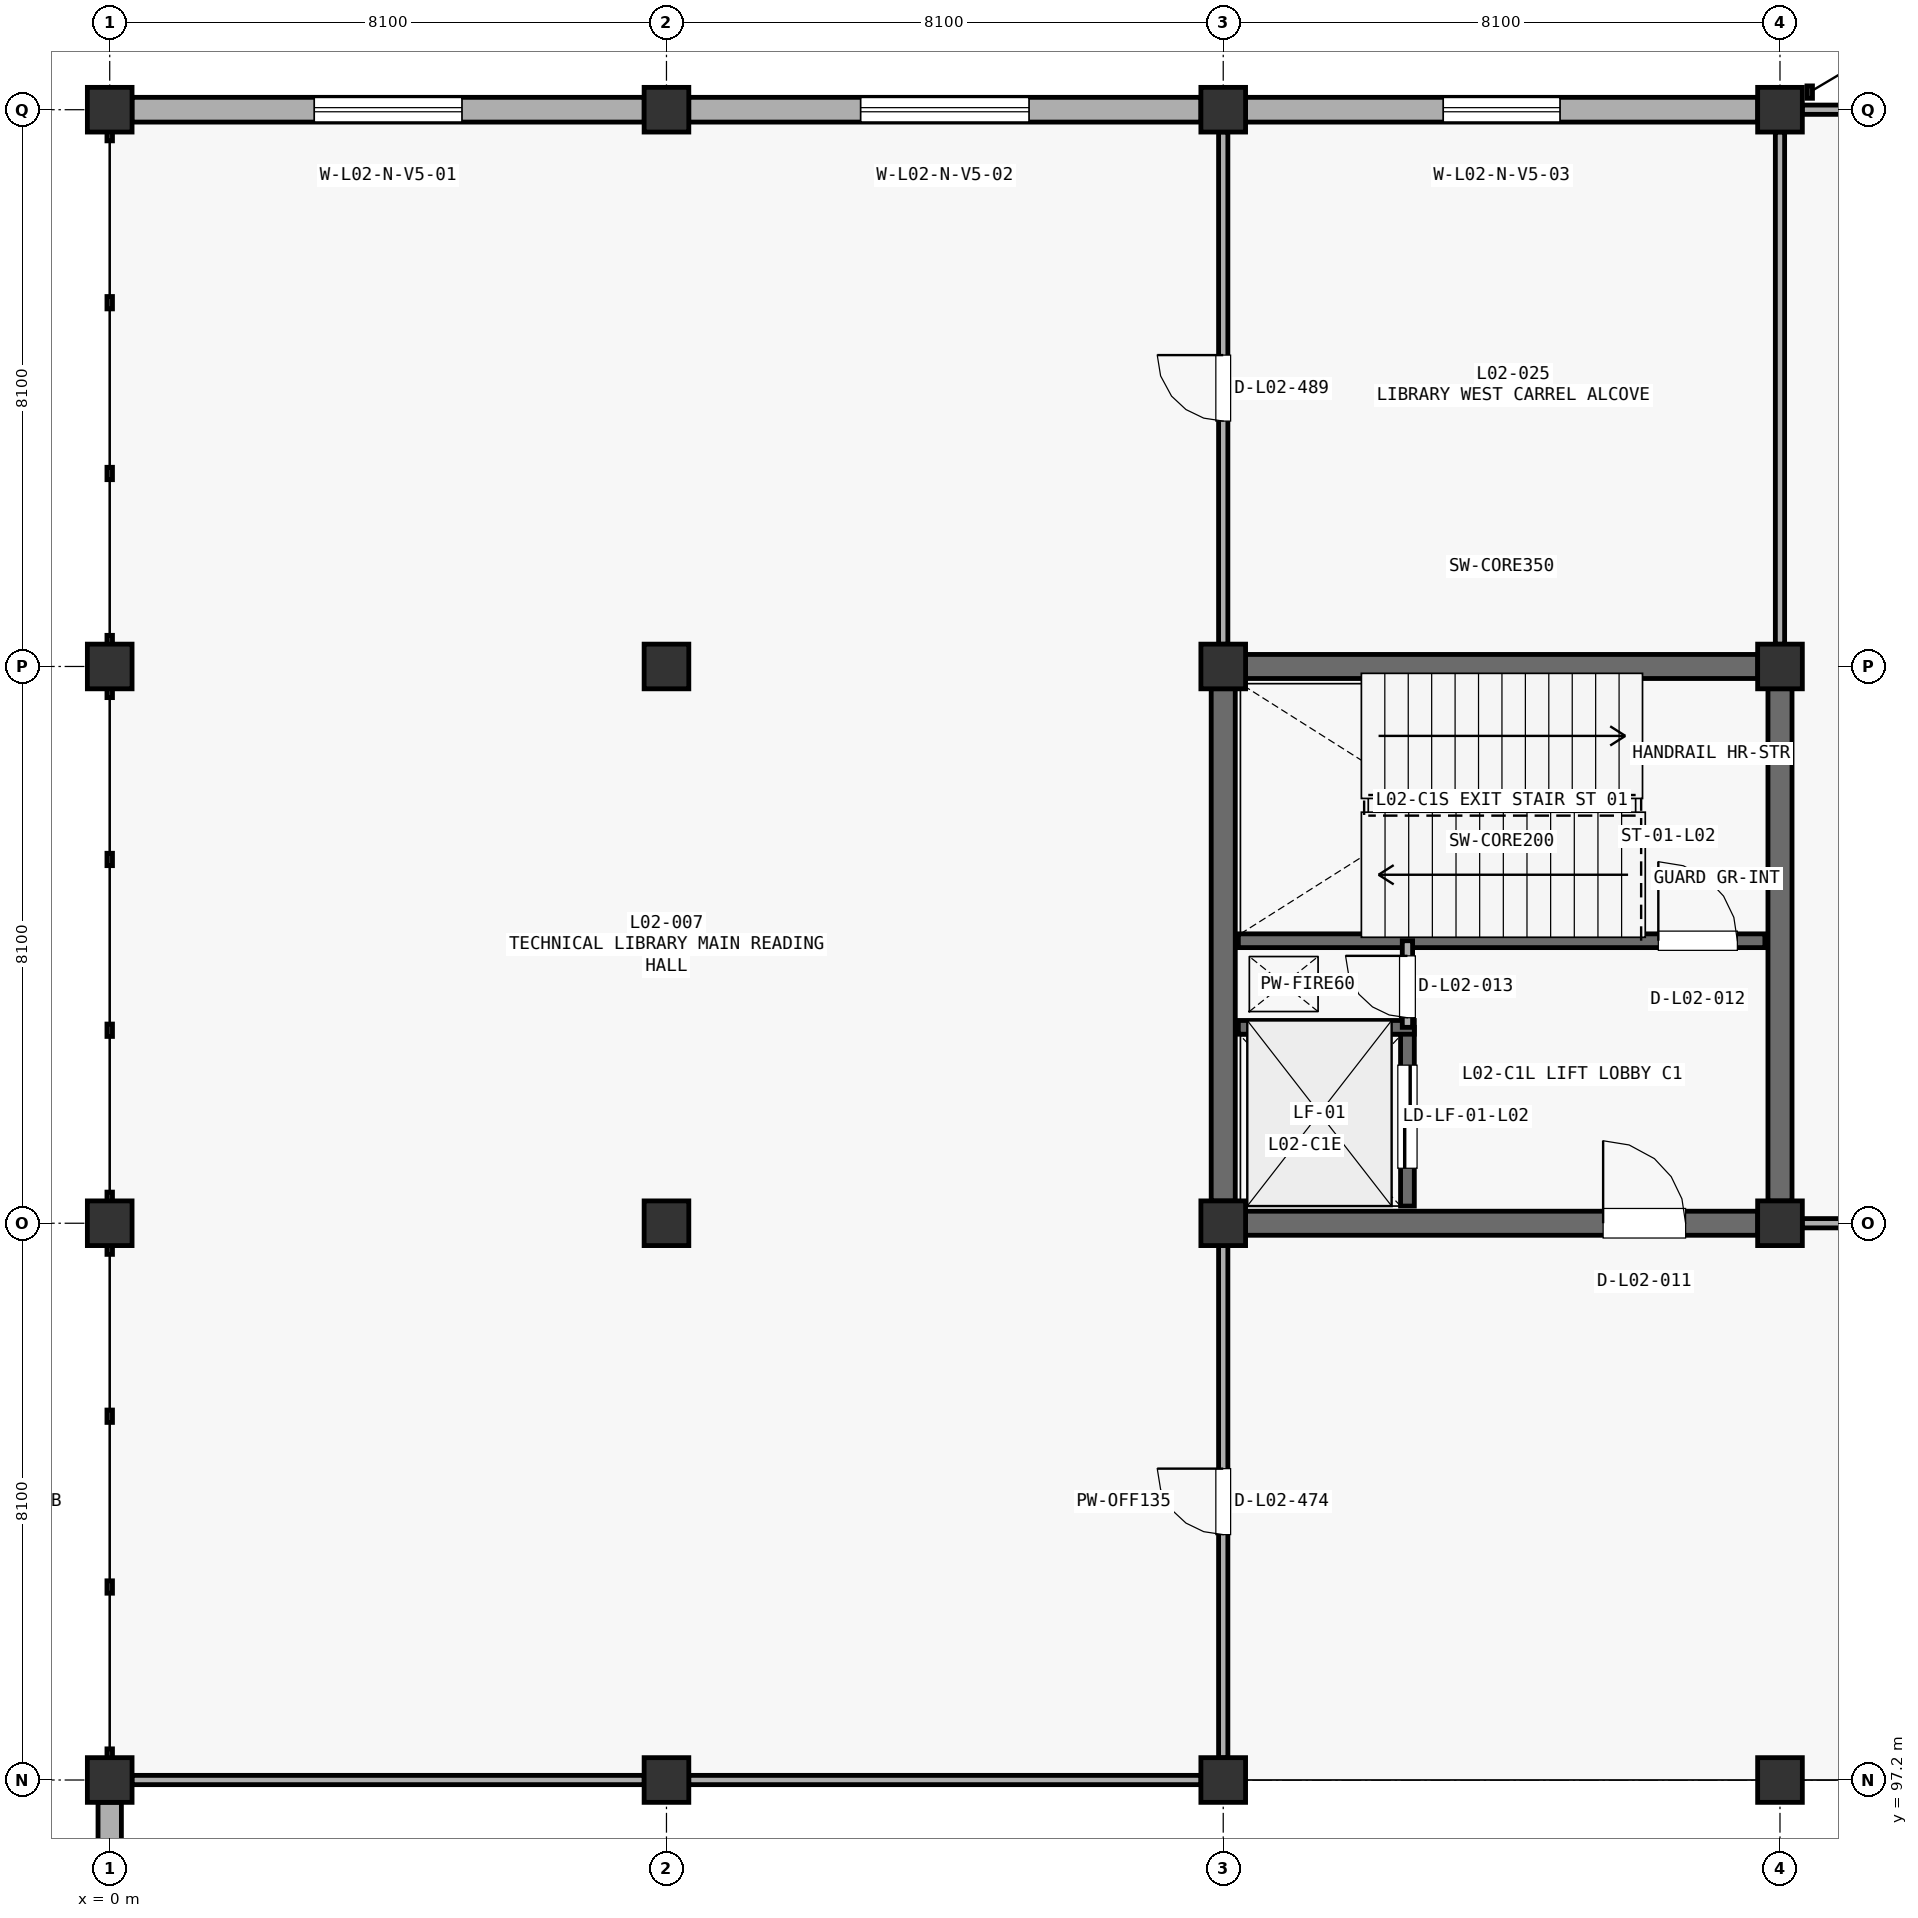
"""IFC4 building model, lengths in metres.
Left out: names, types, materials, properties, quantities, classifications, styles, units other than length and angle.
Written with IfcOpenShell. Run it as: python <this file> out.ifc"""

import sys

from ifc_helpers import new_model, si_unit, direction, frame, frame_2d, origin, origin_2d, place, context, subcontext, project, spatial, rectangle, extrude, element, fill, save


model = new_model("IFC4")
c1 = context("Model", 3, precision=1e-05, world=origin(), true_north=direction((0.0, 1.0)))
c2 = subcontext(c1, "Body", "Model", "MODEL_VIEW")
j1 = project(units=[si_unit("LENGTHUNIT", "METRE"), si_unit("PLANEANGLEUNIT", "RADIAN")], contexts=[c1])
p1 = place(None, origin())
s1 = spatial("IfcSite", under=j1, at=p1, CompositionType="ELEMENT")
p2 = place(p1, origin())
s2 = spatial("IfcBuilding", under=s1, at=p2, CompositionType="ELEMENT")
p3 = place(p2, frame((0.0, 0.0, 9.69)))
s3 = spatial("IfcBuildingStorey", under=s2, at=p3, CompositionType="ELEMENT", Elevation=9.69)
for number, where, z_axis, x_axis in (
    (1, (0.0, 97.2, 0.0), (0.0, 0.0, 1.0), (1.0, 0.0, 0.0)),
    (2, (0.0, 105.3, 0.0), (0.0, 0.0, 1.0), (1.0, 0.0, 0.0)),
    (3, (0.0, 113.4, 0.0), (0.0, 0.0, 1.0), (1.0, 0.0, 0.0)),
    (4, (0.0, 121.5, 0.0), (0.0, 0.0, 1.0), (1.0, 0.0, 0.0)),
    (5, (8.1, 97.2, 0.0), (0.0, 0.0, 1.0), (1.0, 0.0, 0.0)),
    (6, (8.1, 105.3, 0.0), (0.0, 0.0, 1.0), (1.0, 0.0, 0.0)),
    (7, (8.1, 113.4, 0.0), (0.0, 0.0, 1.0), (1.0, 0.0, 0.0)),
    (8, (8.1, 121.5, 0.0), (0.0, 0.0, 1.0), (1.0, 0.0, 0.0)),
    (9, (16.2, 97.2, 0.0), (0.0, 0.0, 1.0), (1.0, 0.0, 0.0)),
    (10, (16.2, 105.3, 0.0), (0.0, 0.0, 1.0), (1.0, 0.0, 0.0)),
    (11, (16.2, 113.4, 0.0), (0.0, 0.0, 1.0), (1.0, 0.0, 0.0)),
    (12, (16.2, 121.5, 0.0), (0.0, 0.0, 1.0), (1.0, 0.0, 0.0)),
    (13, (24.3, 97.2, 0.0), (0.0, 0.0, 1.0), (1.0, 0.0, 0.0)),
    (14, (24.3, 105.3, 0.0), (0.0, 0.0, 1.0), (1.0, 0.0, 0.0)),
    (15, (24.3, 113.4, 0.0), (0.0, 0.0, 1.0), (1.0, 0.0, 0.0)),
    (16, (24.3, 121.5, 0.0), (0.0, 0.0, 1.0), (1.0, 0.0, 0.0)),
):
    element("IfcColumn", number, at=place(p3, frame(where, z_axis=z_axis, x_axis=x_axis)), inside=s3, PredefinedType="COLUMN", context=c2, shape_type="SweptSolid", body=[
        extrude(rectangle(XDim=0.65, YDim=0.65, at=origin_2d()), origin(), (0.0, 0.0, 1.0), 4.42),
    ])
p4 = place(p3, frame((0.0, 89.225, -0.38), z_axis=(0.0, 0.0, 1.0), x_axis=(0.0, 1.0, 0.0)))
e17 = element("IfcWall", 17, at=p4, inside=s3, PredefinedType="STANDARD", context=c2, shape_type="SweptSolid", body=[
    extrude(rectangle(XDim=7.652, YDim=0.34, at=frame_2d((3.826, 0.0))), origin(), (0.0, 0.0, 1.0), 4.522),
])
p5 = place(p4, frame((2.776, 0.0, 1.63)))
e18 = element("IfcOpeningElement", 18, at=p5, cuts=e17, PredefinedType="OPENING", context=c2, shape_type="SweptSolid", body=[
    extrude(rectangle(XDim=2.1, YDim=1.5, at=frame_2d((1.05, 0.75))), frame((0.0, 0.18, 0.0), z_axis=(0.0, -1.0, 0.0), x_axis=(1.0, 0.0, 0.0)), (0.0, 0.0, 1.0), 0.36),
])
p6 = place(p3, frame((0.323, 121.5, 0.0), z_axis=(0.0, 0.0, 1.0), x_axis=(1.0, 0.0, 0.0)))
e19 = element("IfcWall", 19, at=p6, inside=s3, PredefinedType="STANDARD", context=c2, shape_type="SweptSolid", body=[
    extrude(rectangle(XDim=7.454, YDim=0.36, at=frame_2d((3.727, 0.0))), origin(), (0.0, 0.0, 1.0), 3.667),
])
p7 = place(p6, frame((2.652, 0.0, 0.85)))
e20 = element("IfcOpeningElement", 20, at=p7, cuts=e19, PredefinedType="OPENING", context=c2, shape_type="SweptSolid", body=[
    extrude(rectangle(XDim=2.15, YDim=1.7, at=frame_2d((1.075, 0.85))), frame((0.0, 0.19, 0.0), z_axis=(0.0, -1.0, 0.0), x_axis=(1.0, 0.0, 0.0)), (0.0, 0.0, 1.0), 0.38),
])
p8 = place(p3, frame((8.423, 121.5, 0.0), z_axis=(0.0, 0.0, 1.0), x_axis=(1.0, 0.0, 0.0)))
e21 = element("IfcWall", 21, at=p8, inside=s3, PredefinedType="STANDARD", context=c2, shape_type="SweptSolid", body=[
    extrude(rectangle(XDim=7.454, YDim=0.36, at=frame_2d((3.727, 0.0))), origin(), (0.0, 0.0, 1.0), 3.132),
])
p9 = place(p8, frame((2.502, 0.0, 0.85)))
e22 = element("IfcOpeningElement", 22, at=p9, cuts=e21, PredefinedType="OPENING", context=c2, shape_type="SweptSolid", body=[
    extrude(rectangle(XDim=2.45, YDim=1.7, at=frame_2d((1.225, 0.85))), frame((0.0, 0.19, 0.0), z_axis=(0.0, -1.0, 0.0), x_axis=(1.0, 0.0, 0.0)), (0.0, 0.0, 1.0), 0.38),
])
p10 = place(p3, frame((16.523, 121.5, 0.0), z_axis=(0.0, 0.0, 1.0), x_axis=(1.0, 0.0, 0.0)))
e23 = element("IfcWall", 23, at=p10, inside=s3, PredefinedType="STANDARD", context=c2, shape_type="SweptSolid", body=[
    extrude(rectangle(XDim=7.454, YDim=0.36, at=frame_2d((3.727, 0.0))), origin(), (0.0, 0.0, 1.0), 3.332),
])
p11 = place(p10, frame((2.877, 0.0, 0.85)))
e24 = element("IfcOpeningElement", 24, at=p11, cuts=e23, PredefinedType="OPENING", context=c2, shape_type="SweptSolid", body=[
    extrude(rectangle(XDim=1.7, YDim=1.7, at=frame_2d((0.85, 0.85))), frame((0.0, 0.19, 0.0), z_axis=(0.0, -1.0, 0.0), x_axis=(1.0, 0.0, 0.0)), (0.0, 0.0, 1.0), 0.38),
])
p12 = place(p3, frame((16.523, 113.4, 0.0), z_axis=(0.0, 0.0, 1.0), x_axis=(1.0, 0.0, 0.0)))
e25 = element("IfcWall", 25, at=p12, inside=s3, PredefinedType="SHEAR", context=c2, shape_type="SweptSolid", body=[
    extrude(rectangle(XDim=7.454, YDim=0.35, at=frame_2d((3.727, 0.0))), origin(), (0.0, 0.0, 1.0), 4.082),
])
for number, where, z_axis, x_axis in (
    (26, (16.2, 105.623, 0.0), (0.0, 0.0, 1.0), (0.0, 1.0, 0.0)),
    (27, (24.3, 105.623, 0.0), (0.0, 0.0, 1.0), (0.0, 1.0, 0.0)),
):
    element("IfcWall", number, at=place(p3, frame(where, z_axis=z_axis, x_axis=x_axis)), inside=s3, PredefinedType="SHEAR", context=c2, shape_type="SweptSolid", body=[
        extrude(rectangle(XDim=7.454, YDim=0.35, at=frame_2d((3.727, 0.0))), origin(), (0.0, 0.0, 1.0), 4.082),
    ])
p13 = place(p3, frame((16.523, 105.3, 0.0), z_axis=(0.0, 0.0, 1.0), x_axis=(1.0, 0.0, 0.0)))
e28 = element("IfcWall", 28, at=p13, inside=s3, PredefinedType="SHEAR", context=c2, shape_type="SweptSolid", body=[
    extrude(rectangle(XDim=7.454, YDim=0.35, at=frame_2d((3.727, 0.0))), origin(), (0.0, 0.0, 1.0), 4.082),
])
p14 = place(p13, frame((5.204, 0.0, 0.0)))
e29 = element("IfcOpeningElement", 29, at=p14, cuts=e28, PredefinedType="OPENING", context=c2, shape_type="SweptSolid", body=[
    extrude(rectangle(XDim=1.2, YDim=2.2, at=frame_2d((0.6, 1.1))), frame((0.0, 0.185, 0.0), z_axis=(0.0, -1.0, 0.0), x_axis=(1.0, 0.0, 0.0)), (0.0, 0.0, 1.0), 0.37),
])
p15 = place(p3, frame((16.42, 109.41, 0.0), z_axis=(0.0, 0.0, 1.0), x_axis=(1.0, 0.0, 0.0)))
e30 = element("IfcWall", 30, at=p15, inside=s3, PredefinedType="SHEAR", context=c2, shape_type="SweptSolid", body=[
    extrude(rectangle(XDim=7.66, YDim=0.2, at=frame_2d((3.83, 0.0))), origin(), (0.0, 0.0, 1.0), 4.082),
])
p16 = place(p15, frame((6.11, 0.0, 0.0)))
e31 = element("IfcOpeningElement", 31, at=p16, cuts=e30, PredefinedType="OPENING", context=c2, shape_type="SweptSolid", body=[
    extrude(rectangle(XDim=1.15, YDim=2.2, at=frame_2d((0.575, 1.1))), frame((0.0, 0.11, 0.0), z_axis=(0.0, -1.0, 0.0), x_axis=(1.0, 0.0, 0.0)), (0.0, 0.0, 1.0), 0.22),
])
p17 = place(p3, frame((18.88, 105.55, 0.0), z_axis=(0.0, 0.0, 1.0), x_axis=(0.0, 1.0, 0.0)))
e32 = element("IfcWall", 32, at=p17, inside=s3, PredefinedType="SHEAR", context=c2, shape_type="SweptSolid", body=[
    extrude(rectangle(XDim=2.6, YDim=0.2, at=frame_2d((1.3, 0.0))), origin(), (0.0, 0.0, 1.0), 4.082),
])
p18 = place(p17, frame((0.55, 0.0, 0.0)))
e33 = element("IfcOpeningElement", 33, at=p18, cuts=e32, PredefinedType="OPENING", context=c2, shape_type="SweptSolid", body=[
    extrude(rectangle(XDim=1.5, YDim=2.3, at=frame_2d((0.75, 1.15))), frame((0.0, 0.11, 0.0), z_axis=(0.0, -1.0, 0.0), x_axis=(1.0, 0.0, 0.0)), (0.0, 0.0, 1.0), 0.22),
])
p19 = place(p3, frame((16.42, 108.15, 0.0), z_axis=(0.0, 0.0, 1.0), x_axis=(1.0, 0.0, 0.0)))
e34 = element("IfcWall", 34, at=p19, inside=s3, PredefinedType="SHEAR", context=c2, shape_type="SweptSolid", body=[
    extrude(rectangle(XDim=2.56, YDim=0.2, at=frame_2d((1.28, 0.0))), origin(), (0.0, 0.0, 1.0), 4.082),
])
p20 = place(p3, frame((18.88, 108.15, 0.0), z_axis=(0.0, 0.0, 1.0), x_axis=(0.0, 1.0, 0.0)))
e35 = element("IfcWall", 35, at=p20, inside=s3, PredefinedType="PARTITIONING", context=c2, shape_type="SweptSolid", body=[
    extrude(rectangle(XDim=1.26, YDim=0.15, at=frame_2d((0.63, 0.0))), origin(), (0.0, 0.0, 1.0), 4.082),
])
p21 = place(p20, frame((0.14, 0.0, 0.0)))
e36 = element("IfcOpeningElement", 36, at=p21, cuts=e35, PredefinedType="OPENING", context=c2, shape_type="SweptSolid", body=[
    extrude(rectangle(XDim=0.9, YDim=2.15, at=frame_2d((0.45, 1.075))), frame((0.0, 0.085, 0.0), z_axis=(0.0, -1.0, 0.0), x_axis=(1.0, 0.0, 0.0)), (0.0, 0.0, 1.0), 0.17),
])
p22 = place(p3, frame((16.2, 97.523, 0.0), z_axis=(0.0, 0.0, 1.0), x_axis=(0.0, 1.0, 0.0)))
e37 = element("IfcWall", 37, at=p22, inside=s3, PredefinedType="PARTITIONING", context=c2, shape_type="SweptSolid", body=[
    extrude(rectangle(XDim=7.454, YDim=0.135, at=frame_2d((3.727, 0.0))), origin(), (0.0, 0.0, 1.0), 3.132),
])
p23 = place(p22, frame((3.247, 0.0, 0.0)))
e38 = element("IfcOpeningElement", 38, at=p23, cuts=e37, PredefinedType="OPENING", context=c2, shape_type="SweptSolid", body=[
    extrude(rectangle(XDim=0.96, YDim=2.15, at=frame_2d((0.48, 1.075))), frame((0.0, 0.078, 0.0), z_axis=(0.0, -1.0, 0.0), x_axis=(1.0, 0.0, 0.0)), (0.0, 0.0, 1.0), 0.155),
])
p24 = place(p3, frame((16.2, 113.723, 0.0), z_axis=(0.0, 0.0, 1.0), x_axis=(0.0, 1.0, 0.0)))
e39 = element("IfcWall", 39, at=p24, inside=s3, PredefinedType="PARTITIONING", context=c2, shape_type="SweptSolid", body=[
    extrude(rectangle(XDim=7.454, YDim=0.135, at=frame_2d((3.727, 0.0))), origin(), (0.0, 0.0, 1.0), 3.432),
])
p25 = place(p24, frame((3.247, 0.0, 0.0)))
e40 = element("IfcOpeningElement", 40, at=p25, cuts=e39, PredefinedType="OPENING", context=c2, shape_type="SweptSolid", body=[
    extrude(rectangle(XDim=0.96, YDim=2.15, at=frame_2d((0.48, 1.075))), frame((0.0, 0.078, 0.0), z_axis=(0.0, -1.0, 0.0), x_axis=(1.0, 0.0, 0.0)), (0.0, 0.0, 1.0), 0.155),
])
p26 = place(p3, frame((0.323, 97.2, 0.0), z_axis=(0.0, 0.0, 1.0), x_axis=(1.0, 0.0, 0.0)))
e41 = element("IfcWall", 41, at=p26, inside=s3, PredefinedType="PARTITIONING", context=c2, shape_type="SweptSolid", body=[
    extrude(rectangle(XDim=7.454, YDim=0.135, at=frame_2d((3.727, 0.0))), origin(), (0.0, 0.0, 1.0), 3.667),
])
p27 = place(p3, frame((8.423, 97.2, 0.0), z_axis=(0.0, 0.0, 1.0), x_axis=(1.0, 0.0, 0.0)))
e42 = element("IfcWall", 42, at=p27, inside=s3, PredefinedType="PARTITIONING", context=c2, shape_type="SweptSolid", body=[
    extrude(rectangle(XDim=7.454, YDim=0.135, at=frame_2d((3.727, 0.0))), origin(), (0.0, 0.0, 1.0), 3.432),
])
p28 = place(p3, frame((24.623, 105.3, 0.0), z_axis=(0.0, 0.0, 1.0), x_axis=(1.0, 0.0, 0.0)))
e43 = element("IfcWall", 43, at=p28, inside=s3, PredefinedType="PARTITIONING", context=c2, shape_type="SweptSolid", body=[
    extrude(rectangle(XDim=7.454, YDim=0.135, at=frame_2d((3.727, 0.0))), origin(), (0.0, 0.0, 1.0), 3.132),
])
p29 = place(p28, frame((3.247, 0.0, 0.0)))
e44 = element("IfcOpeningElement", 44, at=p29, cuts=e43, PredefinedType="OPENING", context=c2, shape_type="SweptSolid", body=[
    extrude(rectangle(XDim=0.96, YDim=2.15, at=frame_2d((0.48, 1.075))), frame((0.0, 0.078, 0.0), z_axis=(0.0, -1.0, 0.0), x_axis=(1.0, 0.0, 0.0)), (0.0, 0.0, 1.0), 0.155),
])
p30 = place(p3, frame((24.3, 113.723, 0.0), z_axis=(0.0, 0.0, 1.0), x_axis=(0.0, 1.0, 0.0)))
e45 = element("IfcWall", 45, at=p30, inside=s3, PredefinedType="PARTITIONING", context=c2, shape_type="SweptSolid", body=[
    extrude(rectangle(XDim=7.454, YDim=0.135, at=frame_2d((3.727, 0.0))), origin(), (0.0, 0.0, 1.0), 3.232),
])
p31 = place(p3, frame((24.623, 121.5, 0.0), z_axis=(0.0, 0.0, 1.0), x_axis=(1.0, 0.0, 0.0)))
e46 = element("IfcWall", 46, at=p31, inside=s3, PredefinedType="PARTITIONING", context=c2, shape_type="SweptSolid", body=[
    extrude(rectangle(XDim=7.454, YDim=0.135, at=frame_2d((3.727, 0.0))), origin(), (0.0, 0.0, 1.0), 3.667),
])
p32 = place(p7, origin())
e47 = element("IfcWindow", 47, at=p32, inside=s3, PartitioningType="SINGLE_PANEL", PredefinedType="WINDOW", context=c2, shape_type="SweptSolid", body=[
    extrude(rectangle(XDim=2.15, YDim=1.7, at=frame_2d((1.075, 0.85))), frame((0.0, 0.03, 0.0), z_axis=(0.0, -1.0, 0.0), x_axis=(1.0, 0.0, 0.0)), (0.0, 0.0, 1.0), 0.06),
])
fill(e20, e47)
p33 = place(p9, origin())
e48 = element("IfcWindow", 48, at=p33, inside=s3, PartitioningType="SINGLE_PANEL", PredefinedType="WINDOW", context=c2, shape_type="SweptSolid", body=[
    extrude(rectangle(XDim=2.45, YDim=1.7, at=frame_2d((1.225, 0.85))), frame((0.0, 0.03, 0.0), z_axis=(0.0, -1.0, 0.0), x_axis=(1.0, 0.0, 0.0)), (0.0, 0.0, 1.0), 0.06),
])
fill(e22, e48)
p34 = place(p11, origin())
e49 = element("IfcWindow", 49, at=p34, inside=s3, PartitioningType="SINGLE_PANEL", PredefinedType="WINDOW", context=c2, shape_type="SweptSolid", body=[
    extrude(rectangle(XDim=1.7, YDim=1.7, at=frame_2d((0.85, 0.85))), frame((0.0, 0.03, 0.0), z_axis=(0.0, -1.0, 0.0), x_axis=(1.0, 0.0, 0.0)), (0.0, 0.0, 1.0), 0.06),
])
fill(e24, e49)
p35 = place(p14, origin())
e50 = element("IfcDoor", 50, at=p35, inside=s3, OperationType="SINGLE_SWING_LEFT", PredefinedType="DOOR", context=c2, shape_type="SweptSolid", body=[
    extrude(rectangle(XDim=1.2, YDim=2.2, at=frame_2d((0.6, 1.1))), frame((0.0, 0.025, 0.0), z_axis=(0.0, -1.0, 0.0), x_axis=(1.0, 0.0, 0.0)), (0.0, 0.0, 1.0), 0.05),
])
fill(e29, e50)
p36 = place(p16, origin())
e51 = element("IfcDoor", 51, at=p36, inside=s3, OperationType="SINGLE_SWING_LEFT", PredefinedType="DOOR", context=c2, shape_type="SweptSolid", body=[
    extrude(rectangle(XDim=1.15, YDim=2.2, at=frame_2d((0.575, 1.1))), frame((0.0, 0.025, 0.0), z_axis=(0.0, -1.0, 0.0), x_axis=(1.0, 0.0, 0.0)), (0.0, 0.0, 1.0), 0.05),
])
fill(e31, e51)
p37 = place(p18, origin())
e52 = element("IfcDoor", 52, at=p37, inside=s3, OperationType="SLIDING_TO_LEFT", PredefinedType="DOOR", context=c2, shape_type="SweptSolid", body=[
    extrude(rectangle(XDim=1.5, YDim=2.3, at=frame_2d((0.75, 1.15))), frame((0.0, 0.025, 0.0), z_axis=(0.0, -1.0, 0.0), x_axis=(1.0, 0.0, 0.0)), (0.0, 0.0, 1.0), 0.05),
])
fill(e33, e52)
p38 = place(p21, origin())
e53 = element("IfcDoor", 53, at=p38, inside=s3, OperationType="SINGLE_SWING_RIGHT", PredefinedType="DOOR", context=c2, shape_type="SweptSolid", body=[
    extrude(rectangle(XDim=0.9, YDim=2.15, at=frame_2d((0.45, 1.075))), frame((0.0, 0.025, 0.0), z_axis=(0.0, -1.0, 0.0), x_axis=(1.0, 0.0, 0.0)), (0.0, 0.0, 1.0), 0.05),
])
fill(e36, e53)
p39 = place(p23, origin())
e54 = element("IfcDoor", 54, at=p39, inside=s3, OperationType="SINGLE_SWING_RIGHT", PredefinedType="DOOR", context=c2, shape_type="SweptSolid", body=[
    extrude(rectangle(XDim=0.96, YDim=2.15, at=frame_2d((0.48, 1.075))), frame((0.0, 0.025, 0.0), z_axis=(0.0, -1.0, 0.0), x_axis=(1.0, 0.0, 0.0)), (0.0, 0.0, 1.0), 0.05),
])
fill(e38, e54)
p40 = place(p25, origin())
e55 = element("IfcDoor", 55, at=p40, inside=s3, OperationType="SINGLE_SWING_RIGHT", PredefinedType="DOOR", context=c2, shape_type="SweptSolid", body=[
    extrude(rectangle(XDim=0.96, YDim=2.15, at=frame_2d((0.48, 1.075))), frame((0.0, 0.025, 0.0), z_axis=(0.0, -1.0, 0.0), x_axis=(1.0, 0.0, 0.0)), (0.0, 0.0, 1.0), 0.05),
])
fill(e40, e55)
save(model, sys.argv[1])
